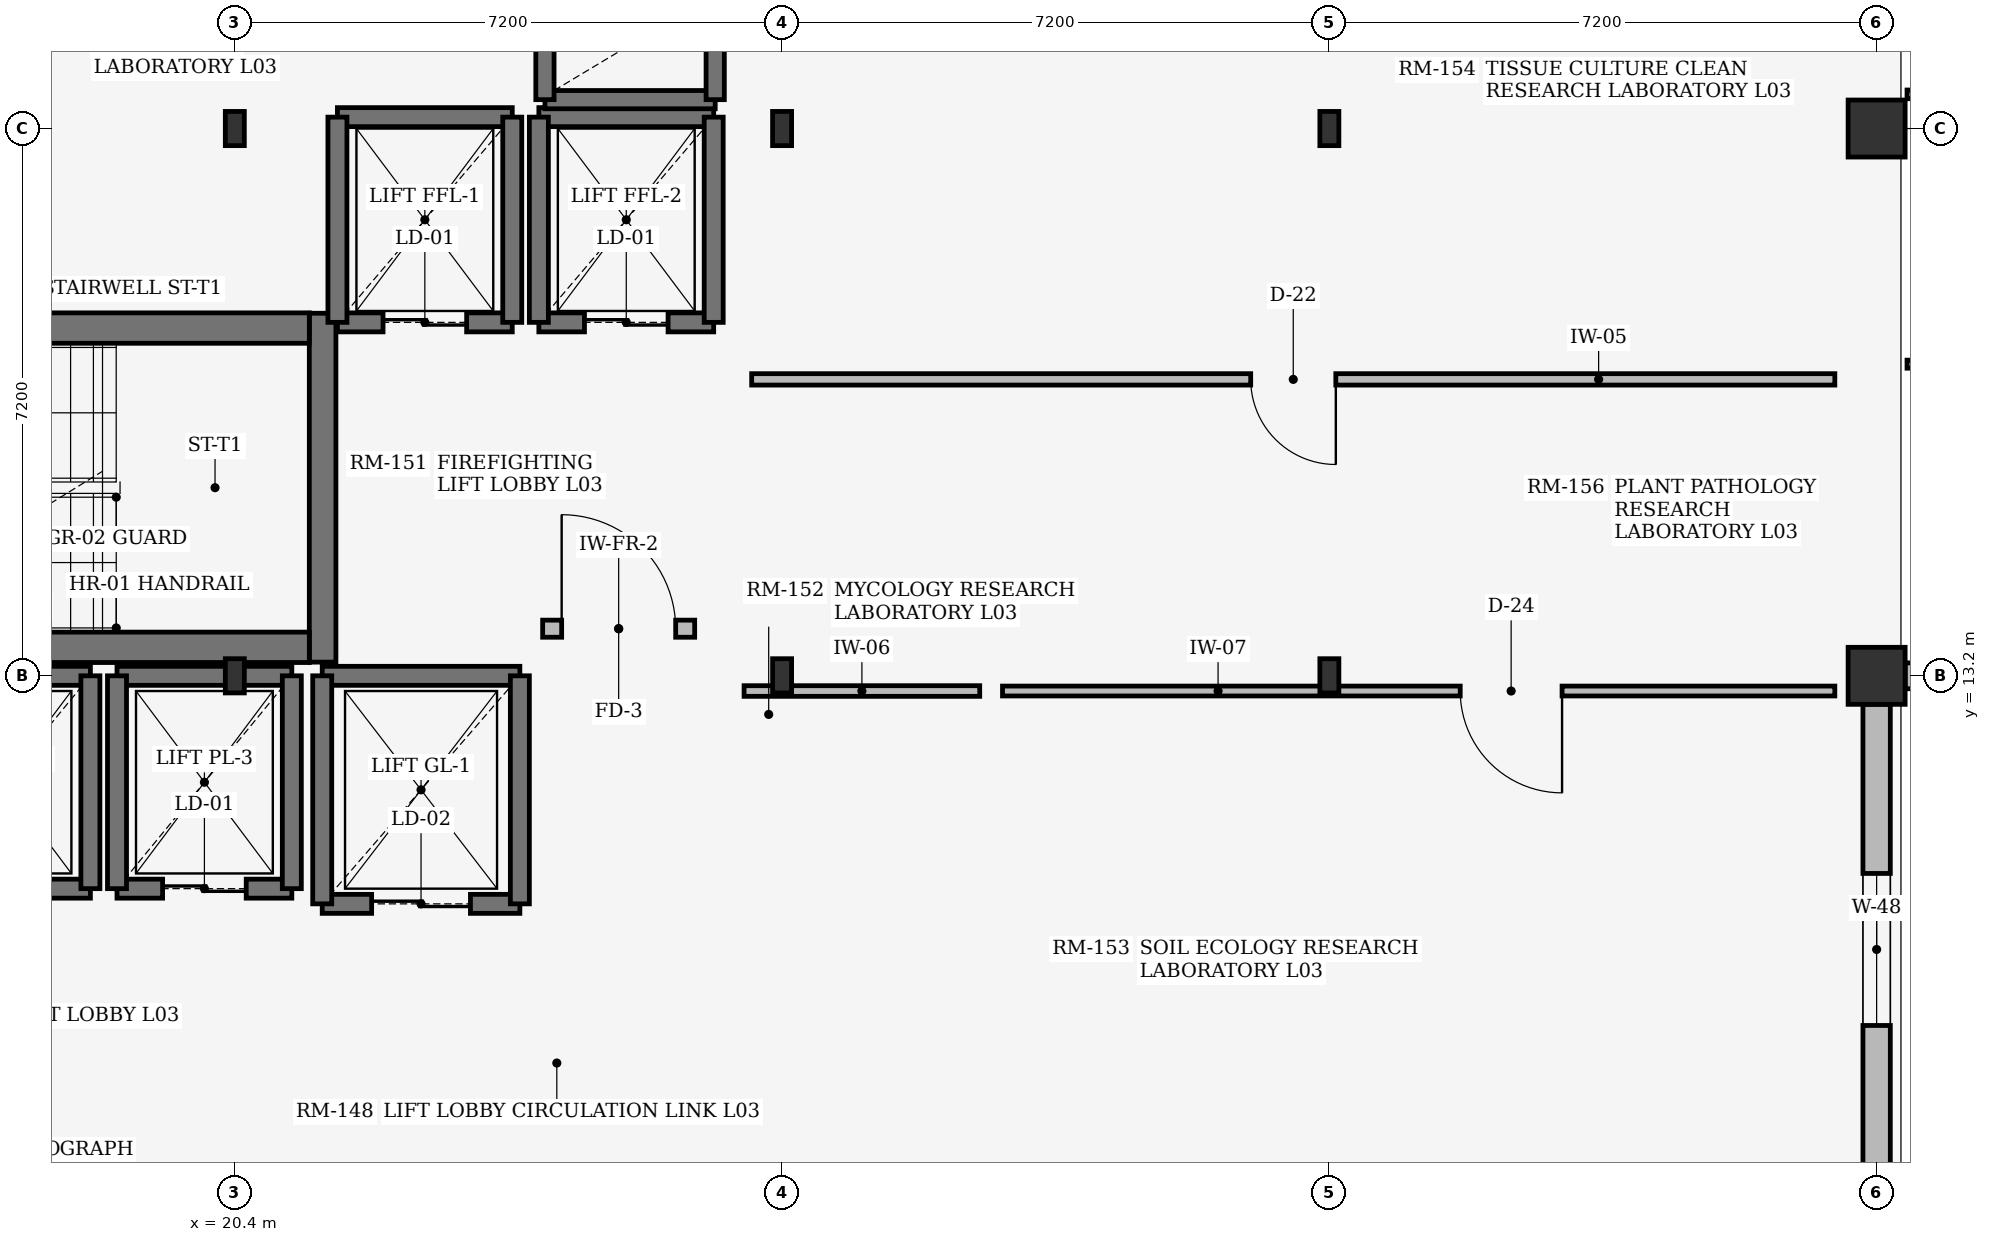
"""IFC4 building model, lengths in metres.
Left out: names, types, materials, properties, quantities, classifications, styles, units other than length and angle.
Written with IfcOpenShell. Run it as: python <this file> out.ifc"""

import sys

from ifc_helpers import new_model, si_unit, direction, frame, frame_2d, origin, origin_2d, place, context, subcontext, project, spatial, rectangle, i_section, extrude, element, fill, save


model = new_model("IFC4")
c1 = context("Model", 3, precision=1e-05, world=origin(), true_north=direction((0.0, 1.0)))
c2 = subcontext(c1, "Body", "Model", "MODEL_VIEW")
j1 = project(units=[si_unit("LENGTHUNIT", "METRE"), si_unit("PLANEANGLEUNIT", "RADIAN")], contexts=[c1])
p1 = place(None, origin())
s1 = spatial("IfcSite", under=j1, at=p1, CompositionType="ELEMENT")
p2 = place(p1, origin())
s2 = spatial("IfcBuilding", under=s1, at=p2, CompositionType="ELEMENT")
p3 = place(p2, frame((0.0, 0.0, 13.2)))
s3 = spatial("IfcBuildingStorey", under=s2, at=p3, CompositionType="ELEMENT", Elevation=13.2)
for number, where, z_axis, x_axis in (
    (1, (20.4, 13.2, 0.0), (0.0, 0.0, 1.0), (1.0, 0.0, 0.0)),
    (2, (20.4, 20.4, 0.0), (0.0, 0.0, 1.0), (1.0, 0.0, 0.0)),
    (3, (27.6, 13.2, 0.0), (0.0, 0.0, 1.0), (1.0, 0.0, 0.0)),
    (4, (27.6, 20.4, 0.0), (0.0, 0.0, 1.0), (1.0, 0.0, 0.0)),
    (5, (34.8, 13.2, 0.0), (0.0, 0.0, 1.0), (1.0, 0.0, 0.0)),
    (6, (34.8, 20.4, 0.0), (0.0, 0.0, 1.0), (1.0, 0.0, 0.0)),
):
    element("IfcColumn", number, at=place(p3, frame(where, z_axis=z_axis, x_axis=x_axis)), inside=s3, PredefinedType="COLUMN", context=c2, shape_type="SweptSolid", body=[
        extrude(i_section(OverallWidth=0.25, OverallDepth=0.45, WebThickness=0.011, FlangeThickness=0.014, at=origin_2d()), origin(), (0.0, 0.0, 1.0), 3.635),
    ])
for number, where, z_axis, x_axis in (
    (7, (42.0, 13.2, 0.0), (0.0, 0.0, 1.0), (1.0, 0.0, 0.0)),
    (8, (42.0, 20.4, 0.0), (0.0, 0.0, 1.0), (1.0, 0.0, 0.0)),
):
    element("IfcColumn", number, at=place(p3, frame(where, z_axis=z_axis, x_axis=x_axis)), inside=s3, PredefinedType="COLUMN", context=c2, shape_type="SweptSolid", body=[
        extrude(rectangle(XDim=0.75, YDim=0.75, at=origin_2d()), origin(), (0.0, 0.0, 1.0), 3.635),
    ])
p4 = place(p3, frame((42.375, 13.2, 0.0), z_axis=(0.0, 0.0, 1.0), x_axis=(1.0, 0.0, 0.0)))
e9 = element("IfcWall", 9, at=p4, inside=s3, PredefinedType="STANDARD", context=c2, shape_type="SweptSolid", body=[
    extrude(rectangle(XDim=6.7, YDim=0.34, at=frame_2d((3.35, 0.0))), origin(), (0.0, 0.0, 1.0), 3.1),
])
p5 = place(p4, frame((2.1, 0.0, 0.75)))
e10 = element("IfcOpeningElement", 10, at=p5, cuts=e9, PredefinedType="OPENING", context=c2, shape_type="SweptSolid", body=[
    extrude(rectangle(XDim=2.5, YDim=1.35, at=frame_2d((1.25, 0.675))), frame((0.0, 0.18, 0.0), z_axis=(0.0, -1.0, 0.0), x_axis=(1.0, 0.0, 0.0)), (0.0, 0.0, 1.0), 0.36),
])
p6 = place(p3, frame((42.0, 6.375, 0.0), z_axis=(0.0, 0.0, 1.0), x_axis=(0.0, 1.0, 0.0)))
e11 = element("IfcWall", 11, at=p6, inside=s3, PredefinedType="STANDARD", context=c2, shape_type="SweptSolid", body=[
    extrude(rectangle(XDim=6.45, YDim=0.36, at=frame_2d((3.225, 0.0))), origin(), (0.0, 0.0, 1.0), 3.015),
])
p7 = place(p6, frame((2.225, 0.0, 0.75)))
e12 = element("IfcOpeningElement", 12, at=p7, cuts=e11, PredefinedType="OPENING", context=c2, shape_type="SweptSolid", body=[
    extrude(rectangle(XDim=2.0, YDim=1.25, at=frame_2d((1.0, 0.625))), frame((0.0, 0.19, 0.0), z_axis=(0.0, -1.0, 0.0), x_axis=(1.0, 0.0, 0.0)), (0.0, 0.0, 1.0), 0.38),
])
p8 = place(p3, frame((21.555, 13.38, 0.0), z_axis=(0.0, 0.0, 1.0), x_axis=(0.0, 1.0, 0.0)))
e13 = element("IfcWall", 13, at=p8, inside=s3, PredefinedType="SHEAR", context=c2, shape_type="SweptSolid", body=[
    extrude(rectangle(XDim=4.59, YDim=0.35, at=frame_2d((2.295, 0.0))), origin(), (0.0, 0.0, 1.0), 3.635),
])
for number, where, z_axis, x_axis in (
    (14, (13.4, 13.575, 0.0), (0.0, 0.0, 1.0), (1.0, 0.0, 0.0)),
    (15, (13.4, 17.775, 0.0), (0.0, 0.0, 1.0), (1.0, 0.0, 0.0)),
):
    element("IfcWall", number, at=place(p3, frame(where, z_axis=z_axis, x_axis=x_axis)), inside=s3, PredefinedType="SHEAR", context=c2, shape_type="SweptSolid", body=[
        extrude(rectangle(XDim=7.98, YDim=0.4, at=frame_2d((3.99, 0.0))), origin(), (0.0, 0.0, 1.0), 3.635),
    ])
p9 = place(p3, frame((21.75, 17.85, 0.0), z_axis=(0.0, 0.0, 1.0), x_axis=(1.0, 0.0, 0.0)))
e16 = element("IfcWall", 16, at=p9, inside=s3, PredefinedType="SHEAR", context=c2, shape_type="SweptSolid", body=[
    extrude(rectangle(XDim=2.3, YDim=0.25, at=frame_2d((1.15, 0.0))), origin(), (0.0, 0.0, 1.0), 3.635),
])
p10 = place(p9, frame((0.6, 0.0, 0.0)))
e17 = element("IfcOpeningElement", 17, at=p10, cuts=e16, PredefinedType="OPENING", context=c2, shape_type="SweptSolid", body=[
    extrude(rectangle(XDim=1.1, YDim=2.2, at=frame_2d((0.55, 1.1))), frame((0.0, 0.135, 0.0), z_axis=(0.0, -1.0, 0.0), x_axis=(1.0, 0.0, 0.0)), (0.0, 0.0, 1.0), 0.27),
])
p11 = place(p3, frame((21.75, 20.55, 0.0), z_axis=(0.0, 0.0, 1.0), x_axis=(1.0, 0.0, 0.0)))
e18 = element("IfcWall", 18, at=p11, inside=s3, PredefinedType="SHEAR", context=c2, shape_type="SweptSolid", body=[
    extrude(rectangle(XDim=2.3, YDim=0.25, at=frame_2d((1.15, 0.0))), origin(), (0.0, 0.0, 1.0), 3.635),
])
for number, where, z_axis, x_axis in (
    (19, (21.75, 17.85, 0.0), (0.0, 0.0, 1.0), (0.0, 1.0, 0.0)),
    (20, (24.05, 17.85, 0.0), (0.0, 0.0, 1.0), (0.0, 1.0, 0.0)),
):
    element("IfcWall", number, at=place(p3, frame(where, z_axis=z_axis, x_axis=x_axis)), inside=s3, PredefinedType="SHEAR", context=c2, shape_type="SweptSolid", body=[
        extrude(rectangle(XDim=2.7, YDim=0.25, at=frame_2d((1.35, 0.0))), origin(), (0.0, 0.0, 1.0), 3.635),
    ])
p12 = place(p3, frame((24.4, 17.85, 0.0), z_axis=(0.0, 0.0, 1.0), x_axis=(1.0, 0.0, 0.0)))
e21 = element("IfcWall", 21, at=p12, inside=s3, PredefinedType="SHEAR", context=c2, shape_type="SweptSolid", body=[
    extrude(rectangle(XDim=2.3, YDim=0.25, at=frame_2d((1.15, 0.0))), origin(), (0.0, 0.0, 1.0), 3.635),
])
p13 = place(p12, frame((0.6, 0.0, 0.0)))
e22 = element("IfcOpeningElement", 22, at=p13, cuts=e21, PredefinedType="OPENING", context=c2, shape_type="SweptSolid", body=[
    extrude(rectangle(XDim=1.1, YDim=2.2, at=frame_2d((0.55, 1.1))), frame((0.0, 0.135, 0.0), z_axis=(0.0, -1.0, 0.0), x_axis=(1.0, 0.0, 0.0)), (0.0, 0.0, 1.0), 0.27),
])
p14 = place(p3, frame((24.4, 20.55, 0.0), z_axis=(0.0, 0.0, 1.0), x_axis=(1.0, 0.0, 0.0)))
e23 = element("IfcWall", 23, at=p14, inside=s3, PredefinedType="SHEAR", context=c2, shape_type="SweptSolid", body=[
    extrude(rectangle(XDim=2.3, YDim=0.25, at=frame_2d((1.15, 0.0))), origin(), (0.0, 0.0, 1.0), 3.635),
])
for number, where, z_axis, x_axis in (
    (24, (24.4, 17.85, 0.0), (0.0, 0.0, 1.0), (0.0, 1.0, 0.0)),
    (25, (26.7, 17.85, 0.0), (0.0, 0.0, 1.0), (0.0, 1.0, 0.0)),
):
    element("IfcWall", number, at=place(p3, frame(where, z_axis=z_axis, x_axis=x_axis)), inside=s3, PredefinedType="SHEAR", context=c2, shape_type="SweptSolid", body=[
        extrude(rectangle(XDim=2.7, YDim=0.25, at=frame_2d((1.35, 0.0))), origin(), (0.0, 0.0, 1.0), 3.635),
    ])
p15 = place(p3, frame((16.2, 10.4, 0.0), z_axis=(0.0, 0.0, 1.0), x_axis=(1.0, 0.0, 0.0)))
e26 = element("IfcWall", 26, at=p15, inside=s3, PredefinedType="SHEAR", context=c2, shape_type="SweptSolid", body=[
    extrude(rectangle(XDim=2.3, YDim=0.25, at=frame_2d((1.15, 0.0))), origin(), (0.0, 0.0, 1.0), 3.635),
])
p16 = place(p15, frame((0.6, 0.0, 0.0)))
e27 = element("IfcOpeningElement", 27, at=p16, cuts=e26, PredefinedType="OPENING", context=c2, shape_type="SweptSolid", body=[
    extrude(rectangle(XDim=1.1, YDim=2.2, at=frame_2d((0.55, 1.1))), frame((0.0, 0.135, 0.0), z_axis=(0.0, -1.0, 0.0), x_axis=(1.0, 0.0, 0.0)), (0.0, 0.0, 1.0), 0.27),
])
p17 = place(p3, frame((16.2, 13.2, 0.0), z_axis=(0.0, 0.0, 1.0), x_axis=(1.0, 0.0, 0.0)))
e28 = element("IfcWall", 28, at=p17, inside=s3, PredefinedType="SHEAR", context=c2, shape_type="SweptSolid", body=[
    extrude(rectangle(XDim=2.3, YDim=0.25, at=frame_2d((1.15, 0.0))), origin(), (0.0, 0.0, 1.0), 3.635),
])
p18 = place(p3, frame((18.5, 10.4, 0.0), z_axis=(0.0, 0.0, 1.0), x_axis=(0.0, 1.0, 0.0)))
e29 = element("IfcWall", 29, at=p18, inside=s3, PredefinedType="SHEAR", context=c2, shape_type="SweptSolid", body=[
    extrude(rectangle(XDim=2.8, YDim=0.25, at=frame_2d((1.4, 0.0))), origin(), (0.0, 0.0, 1.0), 3.635),
])
p19 = place(p3, frame((18.85, 10.4, 0.0), z_axis=(0.0, 0.0, 1.0), x_axis=(1.0, 0.0, 0.0)))
e30 = element("IfcWall", 30, at=p19, inside=s3, PredefinedType="SHEAR", context=c2, shape_type="SweptSolid", body=[
    extrude(rectangle(XDim=2.3, YDim=0.25, at=frame_2d((1.15, 0.0))), origin(), (0.0, 0.0, 1.0), 3.635),
])
p20 = place(p19, frame((0.6, 0.0, 0.0)))
e31 = element("IfcOpeningElement", 31, at=p20, cuts=e30, PredefinedType="OPENING", context=c2, shape_type="SweptSolid", body=[
    extrude(rectangle(XDim=1.1, YDim=2.2, at=frame_2d((0.55, 1.1))), frame((0.0, 0.135, 0.0), z_axis=(0.0, -1.0, 0.0), x_axis=(1.0, 0.0, 0.0)), (0.0, 0.0, 1.0), 0.27),
])
p21 = place(p3, frame((18.85, 13.2, 0.0), z_axis=(0.0, 0.0, 1.0), x_axis=(1.0, 0.0, 0.0)))
e32 = element("IfcWall", 32, at=p21, inside=s3, PredefinedType="SHEAR", context=c2, shape_type="SweptSolid", body=[
    extrude(rectangle(XDim=2.3, YDim=0.25, at=frame_2d((1.15, 0.0))), origin(), (0.0, 0.0, 1.0), 3.635),
])
for number, where, z_axis, x_axis in (
    (33, (18.85, 10.4, 0.0), (0.0, 0.0, 1.0), (0.0, 1.0, 0.0)),
    (34, (21.15, 10.4, 0.0), (0.0, 0.0, 1.0), (0.0, 1.0, 0.0)),
):
    element("IfcWall", number, at=place(p3, frame(where, z_axis=z_axis, x_axis=x_axis)), inside=s3, PredefinedType="SHEAR", context=c2, shape_type="SweptSolid", body=[
        extrude(rectangle(XDim=2.8, YDim=0.25, at=frame_2d((1.4, 0.0))), origin(), (0.0, 0.0, 1.0), 3.635),
    ])
p22 = place(p3, frame((21.55, 10.2, 0.0), z_axis=(0.0, 0.0, 1.0), x_axis=(1.0, 0.0, 0.0)))
e35 = element("IfcWall", 35, at=p22, inside=s3, PredefinedType="SHEAR", context=c2, shape_type="SweptSolid", body=[
    extrude(rectangle(XDim=2.6, YDim=0.25, at=frame_2d((1.3, 0.0))), origin(), (0.0, 0.0, 1.0), 3.635),
])
p23 = place(p22, frame((0.65, 0.0, 0.0)))
e36 = element("IfcOpeningElement", 36, at=p23, cuts=e35, PredefinedType="OPENING", context=c2, shape_type="SweptSolid", body=[
    extrude(rectangle(XDim=1.3, YDim=2.25, at=frame_2d((0.65, 1.125))), frame((0.0, 0.135, 0.0), z_axis=(0.0, -1.0, 0.0), x_axis=(1.0, 0.0, 0.0)), (0.0, 0.0, 1.0), 0.27),
])
p24 = place(p3, frame((21.55, 13.2, 0.0), z_axis=(0.0, 0.0, 1.0), x_axis=(1.0, 0.0, 0.0)))
e37 = element("IfcWall", 37, at=p24, inside=s3, PredefinedType="SHEAR", context=c2, shape_type="SweptSolid", body=[
    extrude(rectangle(XDim=2.6, YDim=0.25, at=frame_2d((1.3, 0.0))), origin(), (0.0, 0.0, 1.0), 3.635),
])
for number, where, z_axis, x_axis in (
    (38, (21.55, 10.2, 0.0), (0.0, 0.0, 1.0), (0.0, 1.0, 0.0)),
    (39, (24.15, 10.2, 0.0), (0.0, 0.0, 1.0), (0.0, 1.0, 0.0)),
):
    element("IfcWall", number, at=place(p3, frame(where, z_axis=z_axis, x_axis=x_axis)), inside=s3, PredefinedType="SHEAR", context=c2, shape_type="SweptSolid", body=[
        extrude(rectangle(XDim=3.0, YDim=0.25, at=frame_2d((1.5, 0.0))), origin(), (0.0, 0.0, 1.0), 3.635),
    ])
p25 = place(p3, frame((24.48, 20.78, 0.0), z_axis=(0.0, 0.0, 1.0), x_axis=(1.0, 0.0, 0.0)))
e40 = element("IfcWall", 40, at=p25, inside=s3, PredefinedType="SHEAR", context=c2, shape_type="SweptSolid", body=[
    extrude(rectangle(XDim=2.24, YDim=0.24, at=frame_2d((1.12, 0.0))), origin(), (0.0, 0.0, 1.0), 3.635),
])
for number, where, z_axis, x_axis in (
    (41, (24.48, 20.78, 0.0), (0.0, 0.0, 1.0), (0.0, 1.0, 0.0)),
    (42, (26.72, 20.78, 0.0), (0.0, 0.0, 1.0), (0.0, 1.0, 0.0)),
):
    element("IfcWall", number, at=place(p3, frame(where, z_axis=z_axis, x_axis=x_axis)), inside=s3, PredefinedType="SHEAR", context=c2, shape_type="SweptSolid", body=[
        extrude(rectangle(XDim=2.94, YDim=0.24, at=frame_2d((1.47, 0.0))), origin(), (0.0, 0.0, 1.0), 3.635),
    ])
p26 = place(p3, frame((24.45, 13.82, 0.0), z_axis=(0.0, 0.0, 1.0), x_axis=(1.0, 0.0, 0.0)))
e43 = element("IfcWall", 43, at=p26, inside=s3, PredefinedType="SOLIDWALL", context=c2, shape_type="SweptSolid", body=[
    extrude(rectangle(XDim=2.0, YDim=0.225, at=frame_2d((1.0, 0.0))), origin(), (0.0, 0.0, 1.0), 3.615),
])
p27 = place(p26, frame((0.25, 0.0, 0.0)))
e44 = element("IfcOpeningElement", 44, at=p27, cuts=e43, PredefinedType="OPENING", context=c2, shape_type="SweptSolid", body=[
    extrude(rectangle(XDim=1.5, YDim=2.2, at=frame_2d((0.75, 1.1))), frame((0.0, 0.123, 0.0), z_axis=(0.0, -1.0, 0.0), x_axis=(1.0, 0.0, 0.0)), (0.0, 0.0, 1.0), 0.245),
])
p28 = place(p3, frame((27.2, 17.1, 0.0), z_axis=(0.0, 0.0, 1.0), x_axis=(1.0, 0.0, 0.0)))
e45 = element("IfcWall", 45, at=p28, inside=s3, PredefinedType="PARTITIONING", context=c2, shape_type="SweptSolid", body=[
    extrude(rectangle(XDim=14.25, YDim=0.15, at=frame_2d((7.125, 0.0))), origin(), (0.0, 0.0, 1.0), 3.615),
])
p29 = place(p28, frame((6.565, 0.0, 0.0)))
e46 = element("IfcOpeningElement", 46, at=p29, cuts=e45, PredefinedType="OPENING", context=c2, shape_type="SweptSolid", body=[
    extrude(rectangle(XDim=1.12, YDim=2.22, at=frame_2d((0.56, 1.11))), frame((0.0, 0.085, 0.0), z_axis=(0.0, -1.0, 0.0), x_axis=(1.0, 0.0, 0.0)), (0.0, 0.0, 1.0), 0.17),
])
p30 = place(p3, frame((27.1, 13.0, 0.0), z_axis=(0.0, 0.0, 1.0), x_axis=(1.0, 0.0, 0.0)))
e47 = element("IfcWall", 47, at=p30, inside=s3, PredefinedType="PARTITIONING", context=c2, shape_type="SweptSolid", body=[
    extrude(rectangle(XDim=3.1, YDim=0.14, at=frame_2d((1.55, 0.0))), origin(), (0.0, 0.0, 1.0), 3.615),
])
p31 = place(p3, frame((30.5, 13.0, 0.0), z_axis=(0.0, 0.0, 1.0), x_axis=(1.0, 0.0, 0.0)))
e48 = element("IfcWall", 48, at=p31, inside=s3, PredefinedType="PARTITIONING", context=c2, shape_type="SweptSolid", body=[
    extrude(rectangle(XDim=10.95, YDim=0.13, at=frame_2d((5.475, 0.0))), origin(), (0.0, 0.0, 1.0), 3.615),
])
p32 = place(p31, frame((6.021, 0.0, 0.0)))
e49 = element("IfcOpeningElement", 49, at=p32, cuts=e48, PredefinedType="OPENING", context=c2, shape_type="SweptSolid", body=[
    extrude(rectangle(XDim=1.34, YDim=2.22, at=frame_2d((0.67, 1.11))), frame((0.0, 0.075, 0.0), z_axis=(0.0, -1.0, 0.0), x_axis=(1.0, 0.0, 0.0)), (0.0, 0.0, 1.0), 0.15),
])
p33 = place(p3, frame((42.4, 17.3, 0.0), z_axis=(0.0, 0.0, 1.0), x_axis=(1.0, 0.0, 0.0)))
e50 = element("IfcWall", 50, at=p33, inside=s3, PredefinedType="PARTITIONING", context=c2, shape_type="SweptSolid", body=[
    extrude(rectangle(XDim=6.6, YDim=0.106, at=frame_2d((3.3, 0.0))), origin(), (0.0, 0.0, 1.0), 3.615),
])
p34 = place(p33, frame((2.44, 0.0, 0.0)))
e51 = element("IfcOpeningElement", 51, at=p34, cuts=e50, PredefinedType="OPENING", context=c2, shape_type="SweptSolid", body=[
    extrude(rectangle(XDim=1.72, YDim=2.32, at=frame_2d((0.86, 1.16))), frame((0.0, 0.063, 0.0), z_axis=(0.0, -1.0, 0.0), x_axis=(1.0, 0.0, 0.0)), (0.0, 0.0, 1.0), 0.126),
])
p35 = place(p3, frame((42.4, 20.85, 0.0), z_axis=(0.0, 0.0, 1.0), x_axis=(1.0, 0.0, 0.0)))
e52 = element("IfcWall", 52, at=p35, inside=s3, PredefinedType="PARTITIONING", context=c2, shape_type="SweptSolid", body=[
    extrude(rectangle(XDim=13.6, YDim=0.114, at=frame_2d((6.8, 0.0))), origin(), (0.0, 0.0, 1.0), 3.615),
])
p36 = place(p35, frame((4.653, 0.0, 0.0)))
e53 = element("IfcOpeningElement", 53, at=p36, cuts=e52, PredefinedType="OPENING", context=c2, shape_type="SweptSolid", body=[
    extrude(rectangle(XDim=0.95, YDim=2.15, at=frame_2d((0.475, 1.075))), frame((0.0, 0.067, 0.0), z_axis=(0.0, -1.0, 0.0), x_axis=(1.0, 0.0, 0.0)), (0.0, 0.0, 1.0), 0.134),
])
p37 = place(p7, origin())
e54 = element("IfcWindow", 54, at=p37, inside=s3, PartitioningType="SINGLE_PANEL", PredefinedType="WINDOW", context=c2, shape_type="SweptSolid", body=[
    extrude(rectangle(XDim=2.0, YDim=1.25, at=frame_2d((1.0, 0.625))), frame((0.0, 0.03, 0.0), z_axis=(0.0, -1.0, 0.0), x_axis=(1.0, 0.0, 0.0)), (0.0, 0.0, 1.0), 0.06),
])
fill(e12, e54)
p38 = place(p10, origin())
e55 = element("IfcDoor", 55, at=p38, inside=s3, OperationType="DOUBLE_DOOR_SLIDING", PredefinedType="DOOR", context=c2, shape_type="SweptSolid", body=[
    extrude(rectangle(XDim=1.1, YDim=2.2, at=frame_2d((0.55, 1.1))), frame((0.0, 0.025, 0.0), z_axis=(0.0, -1.0, 0.0), x_axis=(1.0, 0.0, 0.0)), (0.0, 0.0, 1.0), 0.05),
])
fill(e17, e55)
p39 = place(p13, origin())
e56 = element("IfcDoor", 56, at=p39, inside=s3, OperationType="DOUBLE_DOOR_SLIDING", PredefinedType="DOOR", context=c2, shape_type="SweptSolid", body=[
    extrude(rectangle(XDim=1.1, YDim=2.2, at=frame_2d((0.55, 1.1))), frame((0.0, 0.025, 0.0), z_axis=(0.0, -1.0, 0.0), x_axis=(1.0, 0.0, 0.0)), (0.0, 0.0, 1.0), 0.05),
])
fill(e22, e56)
p40 = place(p20, origin())
e57 = element("IfcDoor", 57, at=p40, inside=s3, OperationType="DOUBLE_DOOR_SLIDING", PredefinedType="DOOR", context=c2, shape_type="SweptSolid", body=[
    extrude(rectangle(XDim=1.1, YDim=2.2, at=frame_2d((0.55, 1.1))), frame((0.0, 0.025, 0.0), z_axis=(0.0, -1.0, 0.0), x_axis=(1.0, 0.0, 0.0)), (0.0, 0.0, 1.0), 0.05),
])
fill(e31, e57)
p41 = place(p23, origin())
e58 = element("IfcDoor", 58, at=p41, inside=s3, OperationType="DOUBLE_DOOR_SLIDING", PredefinedType="DOOR", context=c2, shape_type="SweptSolid", body=[
    extrude(rectangle(XDim=1.3, YDim=2.25, at=frame_2d((0.65, 1.125))), frame((0.0, 0.025, 0.0), z_axis=(0.0, -1.0, 0.0), x_axis=(1.0, 0.0, 0.0)), (0.0, 0.0, 1.0), 0.05),
])
fill(e36, e58)
p42 = place(p27, origin())
e59 = element("IfcDoor", 59, at=p42, inside=s3, OperationType="SINGLE_SWING_LEFT", PredefinedType="DOOR", context=c2, shape_type="SweptSolid", body=[
    extrude(rectangle(XDim=1.5, YDim=2.2, at=frame_2d((0.75, 1.1))), frame((0.0, 0.025, 0.0), z_axis=(0.0, -1.0, 0.0), x_axis=(1.0, 0.0, 0.0)), (0.0, 0.0, 1.0), 0.05),
])
fill(e44, e59)
p43 = place(p29, origin())
e60 = element("IfcDoor", 60, at=p43, inside=s3, OperationType="SINGLE_SWING_RIGHT", PredefinedType="DOOR", context=c2, shape_type="SweptSolid", body=[
    extrude(rectangle(XDim=1.12, YDim=2.22, at=frame_2d((0.56, 1.11))), frame((0.0, 0.025, 0.0), z_axis=(0.0, -1.0, 0.0), x_axis=(1.0, 0.0, 0.0)), (0.0, 0.0, 1.0), 0.05),
])
fill(e46, e60)
p44 = place(p32, origin())
e61 = element("IfcDoor", 61, at=p44, inside=s3, OperationType="SINGLE_SWING_RIGHT", PredefinedType="DOOR", context=c2, shape_type="SweptSolid", body=[
    extrude(rectangle(XDim=1.34, YDim=2.22, at=frame_2d((0.67, 1.11))), frame((0.0, 0.025, 0.0), z_axis=(0.0, -1.0, 0.0), x_axis=(1.0, 0.0, 0.0)), (0.0, 0.0, 1.0), 0.05),
])
fill(e49, e61)
save(model, sys.argv[1])
